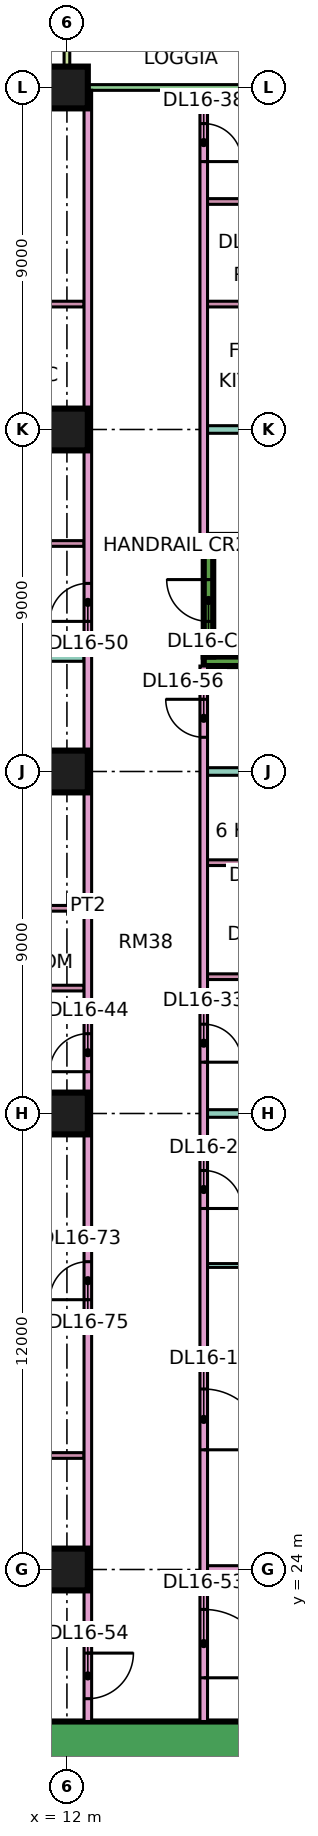
"""IFC4 building model, lengths in metres.
Left out: names, types, materials, properties, quantities, classifications, styles, units other than length and angle.
Written with IfcOpenShell. Run it as: python <this file> out.ifc"""

import sys

from ifc_helpers import new_model, si_unit, direction, frame, frame_2d, origin, origin_2d, place, context, subcontext, project, spatial, rectangle, extrude, element, fill, save


model = new_model("IFC4")
c1 = context("Model", 3, precision=1e-05, world=origin(), true_north=direction((0.0, 1.0)))
c2 = subcontext(c1, "Body", "Model", "MODEL_VIEW")
j1 = project(units=[si_unit("LENGTHUNIT", "METRE"), si_unit("PLANEANGLEUNIT", "RADIAN")], contexts=[c1])
p1 = place(None, origin())
s1 = spatial("IfcSite", under=j1, at=p1, CompositionType="ELEMENT")
p2 = place(p1, origin())
s2 = spatial("IfcBuilding", under=s1, at=p2, CompositionType="ELEMENT")
p3 = place(p2, frame((0.0, 0.0, 75.15)))
s3 = spatial("IfcBuildingStorey", under=s2, at=p3, CompositionType="ELEMENT", Elevation=75.15)
for number, where, z_axis, x_axis in (
    (1, (12.0, 24.0, 0.0), (0.0, 0.0, 1.0), (1.0, 0.0, 0.0)),
    (2, (12.0, 36.0, 0.0), (0.0, 0.0, 1.0), (1.0, 0.0, 0.0)),
    (3, (12.0, 45.0, 0.0), (0.0, 0.0, 1.0), (1.0, 0.0, 0.0)),
    (4, (12.0, 54.0, 0.0), (0.0, 0.0, 1.0), (1.0, 0.0, 0.0)),
    (5, (12.0, 63.0, 0.0), (0.0, 0.0, 1.0), (1.0, 0.0, 0.0)),
):
    element("IfcColumn", number, at=place(p3, frame(where, z_axis=z_axis, x_axis=x_axis)), inside=s3, PredefinedType="COLUMN", context=c2, shape_type="SweptSolid", body=[
        extrude(rectangle(XDim=1.1, YDim=1.1, at=origin_2d()), origin(), (0.0, 0.0, 1.0), 3.75),
    ])
p4 = place(p3, frame((9.0, 19.45, 0.0), z_axis=(0.0, 0.0, 1.0), x_axis=(1.0, 0.0, 0.0)))
e6 = element("IfcWall", 6, at=p4, inside=s3, PredefinedType="SHEAR", context=c2, shape_type="SweptSolid", body=[
    extrude(rectangle(XDim=25.0, YDim=1.1, at=frame_2d((12.5, 0.0))), origin(), (0.0, 0.0, 1.0), 3.75),
])
p5 = place(p4, frame((19.1, 0.0, 0.0)))
e7 = element("IfcOpeningElement", 7, at=p5, cuts=e6, PredefinedType="OPENING", context=c2, shape_type="SweptSolid", body=[
    extrude(rectangle(XDim=1.8, YDim=2.4, at=frame_2d((0.9, 1.2))), frame((0.0, 0.56, 0.0), z_axis=(0.0, -1.0, 0.0), x_axis=(1.0, 0.0, 0.0)), (0.0, 0.0, 1.0), 1.12),
])
for number, where, z_axis, x_axis in (
    (8, (15.6, 47.9, 0.0), (0.0, 0.0, 1.0), (1.0, 0.0, 0.0)),
    (9, (15.6, 51.1, 0.0), (0.0, 0.0, 1.0), (1.0, 0.0, 0.0)),
):
    element("IfcWall", number, at=place(p3, frame(where, z_axis=z_axis, x_axis=x_axis)), inside=s3, PredefinedType="SHEAR", context=c2, shape_type="SweptSolid", body=[
        extrude(rectangle(XDim=7.0, YDim=0.25, at=frame_2d((3.5, 0.0))), origin(), (0.0, 0.0, 1.0), 3.75),
    ])
p6 = place(p3, frame((15.725, 48.025, 0.0), z_axis=(0.0, 0.0, 1.0), x_axis=(0.0, 1.0, 0.0)))
e10 = element("IfcWall", 10, at=p6, inside=s3, PredefinedType="SHEAR", context=c2, shape_type="SweptSolid", body=[
    extrude(rectangle(XDim=2.95, YDim=0.25, at=frame_2d((1.475, 0.0))), origin(), (0.0, 0.0, 1.0), 3.75),
])
p7 = place(p6, frame((0.925, 0.0, 0.0)))
e11 = element("IfcOpeningElement", 11, at=p7, cuts=e10, PredefinedType="OPENING", context=c2, shape_type="SweptSolid", body=[
    extrude(rectangle(XDim=1.1, YDim=2.2, at=frame_2d((0.55, 1.1))), frame((0.0, 0.135, 0.0), z_axis=(0.0, -1.0, 0.0), x_axis=(1.0, 0.0, 0.0)), (0.0, 0.0, 1.0), 0.27),
])
p8 = place(p3, frame((22.425, 63.0, 0.0), z_axis=(0.0, 0.0, 1.0), x_axis=(-1.0, 0.0, 0.0)))
e12 = element("IfcWall", 12, at=p8, inside=s3, PredefinedType="SOLIDWALL", context=c2, shape_type="SweptSolid", body=[
    extrude(rectangle(XDim=10.35, YDim=0.15, at=frame_2d((5.175, 0.0))), origin(), (0.0, 0.0, 1.0), 3.35),
])
p9 = place(p8, frame((2.512, 0.0, 0.0)))
e13 = element("IfcOpeningElement", 13, at=p9, cuts=e12, PredefinedType="OPENING", context=c2, shape_type="SweptSolid", body=[
    extrude(rectangle(XDim=1.8, YDim=2.4, at=frame_2d((0.9, 1.2))), frame((0.0, 0.085, 0.0), z_axis=(0.0, -1.0, 0.0), x_axis=(1.0, 0.0, 0.0)), (0.0, 0.0, 1.0), 0.17),
])
p10 = place(p3, frame((12.0, 64.5, 0.0), z_axis=(0.0, 0.0, 1.0), x_axis=(0.0, -1.0, 0.0)))
e14 = element("IfcWall", 14, at=p10, inside=s3, PredefinedType="SOLIDWALL", context=c2, shape_type="SweptSolid", body=[
    extrude(rectangle(XDim=1.5, YDim=0.15, at=frame_2d((0.75, 0.0))), origin(), (0.0, 0.0, 1.0), 3.35),
])
p11 = place(p3, frame((0.0, 36.0, 0.0), z_axis=(0.0, 0.0, 1.0), x_axis=(1.0, 0.0, 0.0)))
e15 = element("IfcWall", 15, at=p11, inside=s3, PredefinedType="PARTITIONING", context=c2, shape_type="SweptSolid", body=[
    extrude(rectangle(XDim=12.45, YDim=0.2, at=frame_2d((6.225, 0.0))), origin(), (0.0, 0.0, 1.0), 3.35),
])
p12 = place(p3, frame((0.0, 48.0, 0.0), z_axis=(0.0, 0.0, 1.0), x_axis=(1.0, 0.0, 0.0)))
e16 = element("IfcWall", 16, at=p12, inside=s3, PredefinedType="PARTITIONING", context=c2, shape_type="SweptSolid", body=[
    extrude(rectangle(XDim=12.45, YDim=0.2, at=frame_2d((6.225, 0.0))), origin(), (0.0, 0.0, 1.0), 3.35),
])
p13 = place(p3, frame((0.074, 22.4, 0.0), z_axis=(0.0, 0.0, 1.0), x_axis=(1.0, 0.0, 0.0)))
e17 = element("IfcWall", 17, at=p13, inside=s3, PredefinedType="PARTITIONING", context=c2, shape_type="SweptSolid", body=[
    extrude(rectangle(XDim=12.376, YDim=0.2, at=frame_2d((6.188, 0.0))), origin(), (0.0, 0.0, 1.0), 3.35),
])
p14 = place(p3, frame((7.7, 32.7, 0.0), z_axis=(0.0, 0.0, 1.0), x_axis=(1.0, 0.0, 0.0)))
e18 = element("IfcWall", 18, at=p14, inside=s3, PredefinedType="PARTITIONING", context=c2, shape_type="SweptSolid", body=[
    extrude(rectangle(XDim=4.75, YDim=0.1, at=frame_2d((2.375, 0.0))), origin(), (0.0, 0.0, 1.0), 3.35),
])
p15 = place(p14, frame((2.0, 0.0, 0.0)))
e19 = element("IfcOpeningElement", 19, at=p15, cuts=e18, PredefinedType="OPENING", context=c2, shape_type="SweptSolid", body=[
    extrude(rectangle(XDim=0.9, YDim=2.1, at=frame_2d((0.45, 1.05))), frame((0.0, 0.06, 0.0), z_axis=(0.0, -1.0, 0.0), x_axis=(1.0, 0.0, 0.0)), (0.0, 0.0, 1.0), 0.12),
])
p16 = place(p3, frame((7.825, 27.0, 0.0), z_axis=(0.0, 0.0, 1.0), x_axis=(1.0, 0.0, 0.0)))
e20 = element("IfcWall", 20, at=p16, inside=s3, PredefinedType="PARTITIONING", context=c2, shape_type="SweptSolid", body=[
    extrude(rectangle(XDim=4.625, YDim=0.15, at=frame_2d((2.312, 0.0))), origin(), (0.0, 0.0, 1.0), 3.35),
])
p17 = place(p3, frame((7.825, 30.6, 0.0), z_axis=(0.0, 0.0, 1.0), x_axis=(1.0, 0.0, 0.0)))
e21 = element("IfcWall", 21, at=p17, inside=s3, PredefinedType="PARTITIONING", context=c2, shape_type="SweptSolid", body=[
    extrude(rectangle(XDim=4.625, YDim=0.15, at=frame_2d((2.312, 0.0))), origin(), (0.0, 0.0, 1.0), 3.35),
])
p18 = place(p17, frame((1.875, 0.0, 0.0)))
e22 = element("IfcOpeningElement", 22, at=p18, cuts=e21, PredefinedType="OPENING", context=c2, shape_type="SweptSolid", body=[
    extrude(rectangle(XDim=0.8, YDim=2.1, at=frame_2d((0.4, 1.05))), frame((0.0, 0.085, 0.0), z_axis=(0.0, -1.0, 0.0), x_axis=(1.0, 0.0, 0.0)), (0.0, 0.0, 1.0), 0.17),
])
for number, where, z_axis, x_axis in (
    (23, (7.825, 51.0, 0.0), (0.0, 0.0, 1.0), (1.0, 0.0, 0.0)),
    (24, (7.825, 54.3, 0.0), (0.0, 0.0, 1.0), (1.0, 0.0, 0.0)),
    (25, (7.825, 57.3, 0.0), (0.0, 0.0, 1.0), (1.0, 0.0, 0.0)),
):
    element("IfcWall", number, at=place(p3, frame(where, z_axis=z_axis, x_axis=x_axis)), inside=s3, PredefinedType="PARTITIONING", context=c2, shape_type="SweptSolid", body=[
        extrude(rectangle(XDim=4.625, YDim=0.15, at=frame_2d((2.312, 0.0))), origin(), (0.0, 0.0, 1.0), 3.35),
    ])
p19 = place(p3, frame((8.425, 39.3, 0.0), z_axis=(0.0, 0.0, 1.0), x_axis=(1.0, 0.0, 0.0)))
e26 = element("IfcWall", 26, at=p19, inside=s3, PredefinedType="PARTITIONING", context=c2, shape_type="SweptSolid", body=[
    extrude(rectangle(XDim=4.025, YDim=0.15, at=frame_2d((2.012, 0.0))), origin(), (0.0, 0.0, 1.0), 3.35),
])
p20 = place(p19, frame((1.675, 0.0, 0.0)))
e27 = element("IfcOpeningElement", 27, at=p20, cuts=e26, PredefinedType="OPENING", context=c2, shape_type="SweptSolid", body=[
    extrude(rectangle(XDim=0.8, YDim=2.1, at=frame_2d((0.4, 1.05))), frame((0.0, 0.085, 0.0), z_axis=(0.0, -1.0, 0.0), x_axis=(1.0, 0.0, 0.0)), (0.0, 0.0, 1.0), 0.17),
])
p21 = place(p3, frame((8.425, 41.4, 0.0), z_axis=(0.0, 0.0, 1.0), x_axis=(1.0, 0.0, 0.0)))
e28 = element("IfcWall", 28, at=p21, inside=s3, PredefinedType="PARTITIONING", context=c2, shape_type="SweptSolid", body=[
    extrude(rectangle(XDim=4.025, YDim=0.15, at=frame_2d((2.012, 0.0))), origin(), (0.0, 0.0, 1.0), 3.35),
])
p22 = place(p3, frame((12.55, 20.0, 0.0), z_axis=(0.0, 0.0, 1.0), x_axis=(0.0, 1.0, 0.0)))
e29 = element("IfcWall", 29, at=p22, inside=s3, PredefinedType="PARTITIONING", context=c2, shape_type="SweptSolid", body=[
    extrude(rectangle(XDim=42.926, YDim=0.2, at=frame_2d((21.463, 0.0))), origin(), (0.0, 0.0, 1.0), 3.35),
])
p23 = place(p22, frame((17.1, 0.0, 0.0)))
e30 = element("IfcOpeningElement", 30, at=p23, cuts=e29, PredefinedType="OPENING", context=c2, shape_type="SweptSolid", body=[
    extrude(rectangle(XDim=1.0, YDim=2.1, at=frame_2d((0.5, 1.05))), frame((0.0, 0.11, 0.0), z_axis=(0.0, -1.0, 0.0), x_axis=(1.0, 0.0, 0.0)), (0.0, 0.0, 1.0), 0.22),
])
p24 = place(p22, frame((28.95, 0.0, 0.0)))
e31 = element("IfcOpeningElement", 31, at=p24, cuts=e29, PredefinedType="OPENING", context=c2, shape_type="SweptSolid", body=[
    extrude(rectangle(XDim=1.0, YDim=2.1, at=frame_2d((0.5, 1.05))), frame((0.0, 0.11, 0.0), z_axis=(0.0, -1.0, 0.0), x_axis=(1.0, 0.0, 0.0)), (0.0, 0.0, 1.0), 0.22),
])
p25 = place(p22, frame((0.6, 0.0, 0.0)))
e32 = element("IfcOpeningElement", 32, at=p25, cuts=e29, PredefinedType="OPENING", context=c2, shape_type="SweptSolid", body=[
    extrude(rectangle(XDim=1.2, YDim=2.1, at=frame_2d((0.6, 1.05))), frame((0.0, 0.11, 0.0), z_axis=(0.0, -1.0, 0.0), x_axis=(1.0, 0.0, 0.0)), (0.0, 0.0, 1.0), 0.22),
])
p26 = place(p22, frame((11.1, 0.0, 0.0)))
e33 = element("IfcOpeningElement", 33, at=p26, cuts=e29, PredefinedType="OPENING", context=c2, shape_type="SweptSolid", body=[
    extrude(rectangle(XDim=1.0, YDim=2.1, at=frame_2d((0.5, 1.05))), frame((0.0, 0.11, 0.0), z_axis=(0.0, -1.0, 0.0), x_axis=(1.0, 0.0, 0.0)), (0.0, 0.0, 1.0), 0.22),
])
p27 = place(p3, frame((15.6, 20.0, 0.0), z_axis=(0.0, 0.0, 1.0), x_axis=(0.0, 1.0, 0.0)))
e34 = element("IfcWall", 34, at=p27, inside=s3, PredefinedType="PARTITIONING", context=c2, shape_type="SweptSolid", body=[
    extrude(rectangle(XDim=27.775, YDim=0.2, at=frame_2d((13.887, 0.0))), origin(), (0.0, 0.0, 1.0), 3.35),
])
p28 = place(p27, frame((7.15, 0.0, 0.0)))
e35 = element("IfcOpeningElement", 35, at=p28, cuts=e34, PredefinedType="OPENING", context=c2, shape_type="SweptSolid", body=[
    extrude(rectangle(XDim=1.6, YDim=2.1, at=frame_2d((0.8, 1.05))), frame((0.0, 0.11, 0.0), z_axis=(0.0, -1.0, 0.0), x_axis=(1.0, 0.0, 0.0)), (0.0, 0.0, 1.0), 0.22),
])
p29 = place(p27, frame((13.5, 0.0, 0.0)))
e36 = element("IfcOpeningElement", 36, at=p29, cuts=e34, PredefinedType="OPENING", context=c2, shape_type="SweptSolid", body=[
    extrude(rectangle(XDim=1.0, YDim=2.1, at=frame_2d((0.5, 1.05))), frame((0.0, 0.11, 0.0), z_axis=(0.0, -1.0, 0.0), x_axis=(1.0, 0.0, 0.0)), (0.0, 0.0, 1.0), 0.22),
])
p30 = place(p27, frame((17.35, 0.0, 0.0)))
e37 = element("IfcOpeningElement", 37, at=p30, cuts=e34, PredefinedType="OPENING", context=c2, shape_type="SweptSolid", body=[
    extrude(rectangle(XDim=1.0, YDim=2.1, at=frame_2d((0.5, 1.05))), frame((0.0, 0.11, 0.0), z_axis=(0.0, -1.0, 0.0), x_axis=(1.0, 0.0, 0.0)), (0.0, 0.0, 1.0), 0.22),
])
p31 = place(p27, frame((1.15, 0.0, 0.0)))
e38 = element("IfcOpeningElement", 38, at=p31, cuts=e34, PredefinedType="OPENING", context=c2, shape_type="SweptSolid", body=[
    extrude(rectangle(XDim=1.8, YDim=2.1, at=frame_2d((0.9, 1.05))), frame((0.0, 0.11, 0.0), z_axis=(0.0, -1.0, 0.0), x_axis=(1.0, 0.0, 0.0)), (0.0, 0.0, 1.0), 0.22),
])
p32 = place(p27, frame((25.9, 0.0, 0.0)))
e39 = element("IfcOpeningElement", 39, at=p32, cuts=e34, PredefinedType="OPENING", context=c2, shape_type="SweptSolid", body=[
    extrude(rectangle(XDim=1.0, YDim=2.1, at=frame_2d((0.5, 1.05))), frame((0.0, 0.11, 0.0), z_axis=(0.0, -1.0, 0.0), x_axis=(1.0, 0.0, 0.0)), (0.0, 0.0, 1.0), 0.22),
])
p33 = place(p3, frame((15.6, 51.225, 0.0), z_axis=(0.0, 0.0, 1.0), x_axis=(0.0, 1.0, 0.0)))
e40 = element("IfcWall", 40, at=p33, inside=s3, PredefinedType="PARTITIONING", context=c2, shape_type="SweptSolid", body=[
    extrude(rectangle(XDim=11.701, YDim=0.2, at=frame_2d((5.851, 0.0))), origin(), (0.0, 0.0, 1.0), 3.35),
])
p34 = place(p33, frame((9.825, 0.0, 0.0)))
e41 = element("IfcOpeningElement", 41, at=p34, cuts=e40, PredefinedType="OPENING", context=c2, shape_type="SweptSolid", body=[
    extrude(rectangle(XDim=1.0, YDim=2.1, at=frame_2d((0.5, 1.05))), frame((0.0, 0.11, 0.0), z_axis=(0.0, -1.0, 0.0), x_axis=(1.0, 0.0, 0.0)), (0.0, 0.0, 1.0), 0.22),
])
p35 = place(p3, frame((15.7, 24.0, 0.0), z_axis=(0.0, 0.0, 1.0), x_axis=(1.0, 0.0, 0.0)))
e42 = element("IfcWall", 42, at=p35, inside=s3, PredefinedType="PARTITIONING", context=c2, shape_type="SweptSolid", body=[
    extrude(rectangle(XDim=5.8, YDim=0.2, at=frame_2d((2.9, 0.0))), origin(), (0.0, 0.0, 1.0), 3.35),
])
p36 = place(p3, frame((15.7, 32.0, 0.0), z_axis=(0.0, 0.0, 1.0), x_axis=(1.0, 0.0, 0.0)))
e43 = element("IfcWall", 43, at=p36, inside=s3, PredefinedType="PARTITIONING", context=c2, shape_type="SweptSolid", body=[
    extrude(rectangle(XDim=5.8, YDim=0.1, at=frame_2d((2.9, 0.0))), origin(), (0.0, 0.0, 1.0), 3.35),
])
p37 = place(p3, frame((15.7, 36.0, 0.0), z_axis=(0.0, 0.0, 1.0), x_axis=(1.0, 0.0, 0.0)))
e44 = element("IfcWall", 44, at=p37, inside=s3, PredefinedType="PARTITIONING", context=c2, shape_type="SweptSolid", body=[
    extrude(rectangle(XDim=8.3, YDim=0.2, at=frame_2d((4.15, 0.0))), origin(), (0.0, 0.0, 1.0), 3.35),
])
p38 = place(p3, frame((15.7, 39.6, 0.0), z_axis=(0.0, 0.0, 1.0), x_axis=(1.0, 0.0, 0.0)))
e45 = element("IfcWall", 45, at=p38, inside=s3, PredefinedType="PARTITIONING", context=c2, shape_type="SweptSolid", body=[
    extrude(rectangle(XDim=3.125, YDim=0.15, at=frame_2d((1.562, 0.0))), origin(), (0.0, 0.0, 1.0), 3.35),
])
p39 = place(p38, frame((1.2, 0.0, 0.0)))
e46 = element("IfcOpeningElement", 46, at=p39, cuts=e45, PredefinedType="OPENING", context=c2, shape_type="SweptSolid", body=[
    extrude(rectangle(XDim=0.8, YDim=2.1, at=frame_2d((0.4, 1.05))), frame((0.0, 0.085, 0.0), z_axis=(0.0, -1.0, 0.0), x_axis=(1.0, 0.0, 0.0)), (0.0, 0.0, 1.0), 0.17),
])
p40 = place(p3, frame((15.7, 42.6, 0.0), z_axis=(0.0, 0.0, 1.0), x_axis=(1.0, 0.0, 0.0)))
e47 = element("IfcWall", 47, at=p40, inside=s3, PredefinedType="PARTITIONING", context=c2, shape_type="SweptSolid", body=[
    extrude(rectangle(XDim=3.125, YDim=0.15, at=frame_2d((1.562, 0.0))), origin(), (0.0, 0.0, 1.0), 3.35),
])
p41 = place(p3, frame((15.7, 45.0, 0.0), z_axis=(0.0, 0.0, 1.0), x_axis=(1.0, 0.0, 0.0)))
e48 = element("IfcWall", 48, at=p41, inside=s3, PredefinedType="PARTITIONING", context=c2, shape_type="SweptSolid", body=[
    extrude(rectangle(XDim=8.226, YDim=0.2, at=frame_2d((4.113, 0.0))), origin(), (0.0, 0.0, 1.0), 3.35),
])
p42 = place(p3, frame((15.7, 54.0, 0.0), z_axis=(0.0, 0.0, 1.0), x_axis=(1.0, 0.0, 0.0)))
e49 = element("IfcWall", 49, at=p42, inside=s3, PredefinedType="PARTITIONING", context=c2, shape_type="SweptSolid", body=[
    extrude(rectangle(XDim=8.3, YDim=0.2, at=frame_2d((4.15, 0.0))), origin(), (0.0, 0.0, 1.0), 3.35),
])
p43 = place(p3, frame((15.7, 57.3, 0.0), z_axis=(0.0, 0.0, 1.0), x_axis=(1.0, 0.0, 0.0)))
e50 = element("IfcWall", 50, at=p43, inside=s3, PredefinedType="PARTITIONING", context=c2, shape_type="SweptSolid", body=[
    extrude(rectangle(XDim=2.825, YDim=0.15, at=frame_2d((1.413, 0.0))), origin(), (0.0, 0.0, 1.0), 3.35),
])
p44 = place(p3, frame((15.7, 60.0, 0.0), z_axis=(0.0, 0.0, 1.0), x_axis=(1.0, 0.0, 0.0)))
e51 = element("IfcWall", 51, at=p44, inside=s3, PredefinedType="PARTITIONING", context=c2, shape_type="SweptSolid", body=[
    extrude(rectangle(XDim=2.825, YDim=0.15, at=frame_2d((1.413, 0.0))), origin(), (0.0, 0.0, 1.0), 3.35),
])
p45 = place(p44, frame((0.95, 0.0, 0.0)))
e52 = element("IfcOpeningElement", 52, at=p45, cuts=e51, PredefinedType="OPENING", context=c2, shape_type="SweptSolid", body=[
    extrude(rectangle(XDim=0.8, YDim=2.1, at=frame_2d((0.4, 1.05))), frame((0.0, 0.085, 0.0), z_axis=(0.0, -1.0, 0.0), x_axis=(1.0, 0.0, 0.0)), (0.0, 0.0, 1.0), 0.17),
])
p46 = place(p7, frame((1.1, 0.0, 0.0), z_axis=(0.0, 0.0, 1.0), x_axis=(-1.0, 0.0, 0.0)))
e53 = element("IfcDoor", 53, at=p46, inside=s3, OperationType="SINGLE_SWING_RIGHT", PredefinedType="DOOR", context=c2, shape_type="SweptSolid", body=[
    extrude(rectangle(XDim=1.1, YDim=2.2, at=frame_2d((0.55, 1.1))), frame((0.0, 0.025, 0.0), z_axis=(0.0, -1.0, 0.0), x_axis=(1.0, 0.0, 0.0)), (0.0, 0.0, 1.0), 0.05),
])
fill(e11, e53)
p47 = place(p28, frame((1.6, 0.0, 0.0), z_axis=(0.0, 0.0, 1.0), x_axis=(-1.0, 0.0, 0.0)))
e54 = element("IfcDoor", 54, at=p47, inside=s3, OperationType="DOUBLE_DOOR_SINGLE_SWING", PredefinedType="DOOR", context=c2, shape_type="SweptSolid", body=[
    extrude(rectangle(XDim=1.6, YDim=2.1, at=frame_2d((0.8, 1.05))), frame((0.0, 0.025, 0.0), z_axis=(0.0, -1.0, 0.0), x_axis=(1.0, 0.0, 0.0)), (0.0, 0.0, 1.0), 0.05),
])
fill(e35, e54)
p48 = place(p29, frame((1.0, 0.0, 0.0), z_axis=(0.0, 0.0, 1.0), x_axis=(-1.0, 0.0, 0.0)))
e55 = element("IfcDoor", 55, at=p48, inside=s3, OperationType="SINGLE_SWING_LEFT", PredefinedType="DOOR", context=c2, shape_type="SweptSolid", body=[
    extrude(rectangle(XDim=1.0, YDim=2.1, at=frame_2d((0.5, 1.05))), frame((0.0, 0.025, 0.0), z_axis=(0.0, -1.0, 0.0), x_axis=(1.0, 0.0, 0.0)), (0.0, 0.0, 1.0), 0.05),
])
fill(e36, e55)
p49 = place(p30, frame((1.0, 0.0, 0.0), z_axis=(0.0, 0.0, 1.0), x_axis=(-1.0, 0.0, 0.0)))
e56 = element("IfcDoor", 56, at=p49, inside=s3, OperationType="SINGLE_SWING_LEFT", PredefinedType="DOOR", context=c2, shape_type="SweptSolid", body=[
    extrude(rectangle(XDim=1.0, YDim=2.1, at=frame_2d((0.5, 1.05))), frame((0.0, 0.025, 0.0), z_axis=(0.0, -1.0, 0.0), x_axis=(1.0, 0.0, 0.0)), (0.0, 0.0, 1.0), 0.05),
])
fill(e37, e56)
p50 = place(p34, frame((1.0, 0.0, 0.0), z_axis=(0.0, 0.0, 1.0), x_axis=(-1.0, 0.0, 0.0)))
e57 = element("IfcDoor", 57, at=p50, inside=s3, OperationType="SINGLE_SWING_LEFT", PredefinedType="DOOR", context=c2, shape_type="SweptSolid", body=[
    extrude(rectangle(XDim=1.0, YDim=2.1, at=frame_2d((0.5, 1.05))), frame((0.0, 0.025, 0.0), z_axis=(0.0, -1.0, 0.0), x_axis=(1.0, 0.0, 0.0)), (0.0, 0.0, 1.0), 0.05),
])
fill(e41, e57)
p51 = place(p23, origin())
e58 = element("IfcDoor", 58, at=p51, inside=s3, OperationType="SINGLE_SWING_LEFT", PredefinedType="DOOR", context=c2, shape_type="SweptSolid", body=[
    extrude(rectangle(XDim=1.0, YDim=2.1, at=frame_2d((0.5, 1.05))), frame((0.0, 0.025, 0.0), z_axis=(0.0, -1.0, 0.0), x_axis=(1.0, 0.0, 0.0)), (0.0, 0.0, 1.0), 0.05),
])
fill(e30, e58)
p52 = place(p24, origin())
e59 = element("IfcDoor", 59, at=p52, inside=s3, OperationType="SINGLE_SWING_LEFT", PredefinedType="DOOR", context=c2, shape_type="SweptSolid", body=[
    extrude(rectangle(XDim=1.0, YDim=2.1, at=frame_2d((0.5, 1.05))), frame((0.0, 0.025, 0.0), z_axis=(0.0, -1.0, 0.0), x_axis=(1.0, 0.0, 0.0)), (0.0, 0.0, 1.0), 0.05),
])
fill(e31, e59)
p53 = place(p31, frame((1.8, 0.0, 0.0), z_axis=(0.0, 0.0, 1.0), x_axis=(-1.0, 0.0, 0.0)))
e60 = element("IfcDoor", 60, at=p53, inside=s3, OperationType="DOUBLE_DOOR_SINGLE_SWING", PredefinedType="DOOR", context=c2, shape_type="SweptSolid", body=[
    extrude(rectangle(XDim=1.8, YDim=2.1, at=frame_2d((0.9, 1.05))), frame((0.0, 0.025, 0.0), z_axis=(0.0, -1.0, 0.0), x_axis=(1.0, 0.0, 0.0)), (0.0, 0.0, 1.0), 0.05),
])
fill(e38, e60)
p54 = place(p25, origin())
e61 = element("IfcDoor", 61, at=p54, inside=s3, OperationType="SINGLE_SWING_RIGHT", PredefinedType="DOOR", context=c2, shape_type="SweptSolid", body=[
    extrude(rectangle(XDim=1.2, YDim=2.1, at=frame_2d((0.6, 1.05))), frame((0.0, 0.025, 0.0), z_axis=(0.0, -1.0, 0.0), x_axis=(1.0, 0.0, 0.0)), (0.0, 0.0, 1.0), 0.05),
])
fill(e32, e61)
p55 = place(p32, frame((1.0, 0.0, 0.0), z_axis=(0.0, 0.0, 1.0), x_axis=(-1.0, 0.0, 0.0)))
e62 = element("IfcDoor", 62, at=p55, inside=s3, OperationType="SINGLE_SWING_RIGHT", PredefinedType="DOOR", context=c2, shape_type="SweptSolid", body=[
    extrude(rectangle(XDim=1.0, YDim=2.1, at=frame_2d((0.5, 1.05))), frame((0.0, 0.025, 0.0), z_axis=(0.0, -1.0, 0.0), x_axis=(1.0, 0.0, 0.0)), (0.0, 0.0, 1.0), 0.05),
])
fill(e39, e62)
p56 = place(p26, origin())
e63 = element("IfcDoor", 63, at=p56, inside=s3, OperationType="SINGLE_SWING_LEFT", PredefinedType="DOOR", context=c2, shape_type="SweptSolid", body=[
    extrude(rectangle(XDim=1.0, YDim=2.1, at=frame_2d((0.5, 1.05))), frame((0.0, 0.025, 0.0), z_axis=(0.0, -1.0, 0.0), x_axis=(1.0, 0.0, 0.0)), (0.0, 0.0, 1.0), 0.05),
])
fill(e33, e63)
save(model, sys.argv[1])
